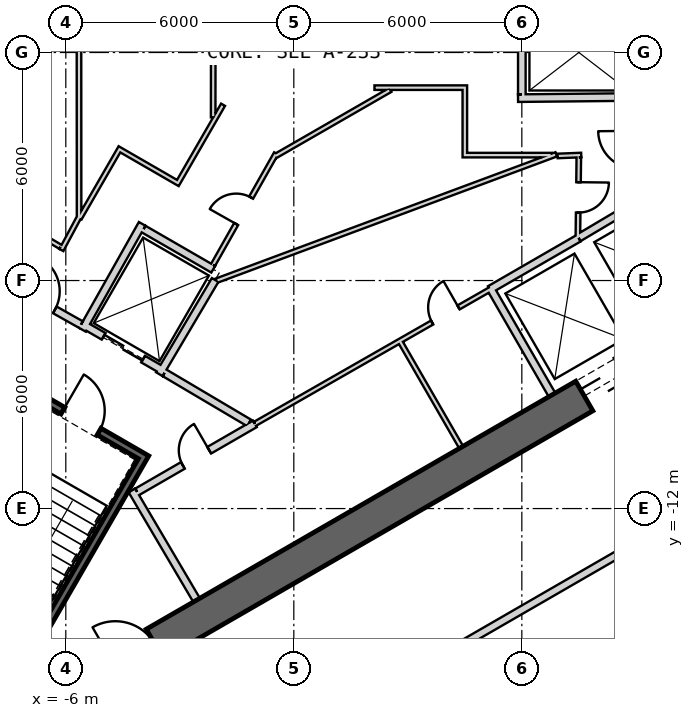
"""IFC4 building model, lengths in metres.
Left out: names, types, materials, properties, quantities, classifications, styles, units other than length and angle.
Written with IfcOpenShell. Run it as: python <this file> out.ifc"""

import sys

from ifc_helpers import new_model, si_unit, direction, frame, frame_2d, origin, place, context, subcontext, project, spatial, rectangle, extrude, element, fill, save


model = new_model("IFC4")
c1 = context("Model", 3, precision=1e-05, world=origin(), true_north=direction((0.0, 1.0)))
c2 = subcontext(c1, "Body", "Model", "MODEL_VIEW")
j1 = project(units=[si_unit("LENGTHUNIT", "METRE"), si_unit("PLANEANGLEUNIT", "RADIAN")], contexts=[c1])
p1 = place(None, origin())
s1 = spatial("IfcSite", under=j1, at=p1, CompositionType="ELEMENT")
p2 = place(p1, origin())
s2 = spatial("IfcBuilding", under=s1, at=p2, CompositionType="ELEMENT")
p3 = place(p2, frame((0.0, 0.0, 298.7)))
s3 = spatial("IfcBuildingStorey", under=s2, at=p3, CompositionType="ELEMENT", Elevation=298.7)
p4 = place(p3, frame((-7.825, -17.97, 0.0), z_axis=(0.0, 0.0, 1.0), x_axis=(0.866028369851, 0.499994862586, 0.0)))
e1 = element("IfcWall", 1, at=p4, inside=s3, PredefinedType="SHEAR", context=c2, shape_type="SweptSolid", body=[
    extrude(rectangle(XDim=31.523, YDim=0.9, at=frame_2d((15.762, 0.0))), origin(), (0.0, 0.0, 1.0), 3.9),
])
p5 = place(p4, frame((17.862, 0.0, 0.0)))
e2 = element("IfcOpeningElement", 2, at=p5, cuts=e1, PredefinedType="OPENING", context=c2, shape_type="SweptSolid", body=[
    extrude(rectangle(XDim=1.2, YDim=2.4, at=frame_2d((0.6, 1.2))), frame((0.0, 0.46, 0.0), z_axis=(0.0, -1.0, 0.0), x_axis=(1.0, 0.0, 0.0)), (0.0, 0.0, 1.0), 0.92),
])
p6 = place(p4, frame((20.562, 0.0, 0.0)))
e3 = element("IfcOpeningElement", 3, at=p6, cuts=e1, PredefinedType="OPENING", context=c2, shape_type="SweptSolid", body=[
    extrude(rectangle(XDim=1.2, YDim=2.4, at=frame_2d((0.6, 1.2))), frame((0.0, 0.46, 0.0), z_axis=(0.0, -1.0, 0.0), x_axis=(1.0, 0.0, 0.0)), (0.0, 0.0, 1.0), 0.92),
])
p7 = place(p4, frame((26.712, 0.0, 0.0)))
e4 = element("IfcOpeningElement", 4, at=p7, cuts=e1, PredefinedType="OPENING", context=c2, shape_type="SweptSolid", body=[
    extrude(rectangle(XDim=1.2, YDim=2.4, at=frame_2d((0.6, 1.2))), frame((0.0, 0.46, 0.0), z_axis=(0.0, -1.0, 0.0), x_axis=(1.0, 0.0, 0.0)), (0.0, 0.0, 1.0), 0.92),
])
p8 = place(p4, frame((3.612, 0.0, 0.0)))
e5 = element("IfcOpeningElement", 5, at=p8, cuts=e1, PredefinedType="OPENING", context=c2, shape_type="SweptSolid", body=[
    extrude(rectangle(XDim=1.2, YDim=2.4, at=frame_2d((0.6, 1.2))), frame((0.0, 0.46, 0.0), z_axis=(0.0, -1.0, 0.0), x_axis=(1.0, 0.0, 0.0)), (0.0, 0.0, 1.0), 0.92),
])
p9 = place(p3, frame((6.795, -9.01, 0.0), z_axis=(0.0, 0.0, 1.0), x_axis=(-0.499984717929, 0.866034226713, 0.0)))
e6 = element("IfcWall", 6, at=p9, inside=s3, PredefinedType="PLUMBINGWALL", context=c2, shape_type="SweptSolid", body=[
    extrude(rectangle(XDim=3.25, YDim=0.2, at=frame_2d((1.625, 0.0))), origin(), (0.0, 0.0, 1.0), 3.6),
])
p10 = place(p3, frame((5.159, -6.236, 0.0), z_axis=(0.0, 0.0, 1.0), x_axis=(0.866036505625, 0.499980770555, 0.0)))
e7 = element("IfcWall", 7, at=p10, inside=s3, PredefinedType="PLUMBINGWALL", context=c2, shape_type="SweptSolid", body=[
    extrude(rectangle(XDim=2.7, YDim=0.2, at=frame_2d((1.35, 0.0))), origin(), (0.0, 0.0, 1.0), 3.6),
])
p11 = place(p3, frame((7.493, -4.878, 0.0), z_axis=(0.0, 0.0, 1.0), x_axis=(0.859981807212, 0.510324691999, 0.0)))
e8 = element("IfcWall", 8, at=p11, inside=s3, PredefinedType="PLUMBINGWALL", context=c2, shape_type="SweptSolid", body=[
    extrude(rectangle(XDim=1.845, YDim=0.2, at=frame_2d((0.922, 0.0))), origin(), (0.0, 0.0, 1.0), 3.6),
])
p12 = place(p3, frame((5.9, -1.201, 0.0), z_axis=(0.0, 0.0, 1.0), x_axis=(0.999950064753, 0.009993397809, 0.0)))
e9 = element("IfcWall", 9, at=p12, inside=s3, PredefinedType="PLUMBINGWALL", context=c2, shape_type="SweptSolid", body=[
    extrude(rectangle(XDim=3.2, YDim=0.2, at=frame_2d((1.6, 0.0))), origin(), (0.0, 0.0, 1.0), 3.6),
])
p13 = place(p3, frame((6.0, -1.1, 0.0), z_axis=(0.0, 0.0, 1.0), x_axis=(0.0, 1.0, 0.0)))
e10 = element("IfcWall", 10, at=p13, inside=s3, PredefinedType="PLUMBINGWALL", context=c2, shape_type="SweptSolid", body=[
    extrude(rectangle(XDim=2.13, YDim=0.2, at=frame_2d((1.065, 0.0))), origin(), (0.0, 0.0, 1.0), 3.6),
])
p14 = place(p3, frame((-3.905, -10.563, -0.3), z_axis=(0.0, 0.0, 1.0), x_axis=(-0.500012932018, -0.866017937352, 0.0)))
e11 = element("IfcWall", 11, at=p14, inside=s3, PredefinedType="SHEAR", context=c2, shape_type="SweptSolid", body=[
    extrude(rectangle(XDim=8.1, YDim=0.2, at=frame_2d((4.05, 0.0))), origin(), (0.0, 0.0, 1.0), 3.9),
])
p15 = place(p3, frame((-4.041, -10.599, -0.3), z_axis=(0.0, 0.0, 1.0), x_axis=(-0.866047807691, 0.499961193289, 0.0)))
e12 = element("IfcWall", 12, at=p15, inside=s3, PredefinedType="SHEAR", context=c2, shape_type="SweptSolid", body=[
    extrude(rectangle(XDim=3.6, YDim=0.2, at=frame_2d((1.8, 0.0))), origin(), (0.0, 0.0, 1.0), 3.9),
])
p16 = place(p15, frame((1.25, 0.0, 0.3)))
e13 = element("IfcOpeningElement", 13, at=p16, cuts=e12, PredefinedType="OPENING", context=c2, shape_type="SweptSolid", body=[
    extrude(rectangle(XDim=1.1, YDim=2.1, at=frame_2d((0.55, 1.05))), frame((0.0, 0.11, 0.0), z_axis=(0.0, -1.0, 0.0), x_axis=(1.0, 0.0, 0.0)), (0.0, 0.0, 1.0), 0.22),
])
p17 = place(p3, frame((-3.446, -8.368, 0.0), z_axis=(0.0, 0.0, 1.0), x_axis=(-0.866024647952, 0.500001309137, 0.0)))
e14 = element("IfcWall", 14, at=p17, inside=s3, PredefinedType="PLUMBINGWALL", context=c2, shape_type="SweptSolid", body=[
    extrude(rectangle(XDim=2.4, YDim=0.2, at=frame_2d((1.2, 0.0))), origin(), (0.0, 0.0, 1.0), 3.6),
])
p18 = place(p17, frame((0.6, 0.0, 0.0)))
e15 = element("IfcOpeningElement", 15, at=p18, cuts=e14, PredefinedType="OPENING", context=c2, shape_type="SweptSolid", body=[
    extrude(rectangle(XDim=1.2, YDim=2.4, at=frame_2d((0.6, 1.2))), frame((0.0, 0.11, 0.0), z_axis=(0.0, -1.0, 0.0), x_axis=(1.0, 0.0, 0.0)), (0.0, 0.0, 1.0), 0.22),
])
p19 = place(p3, frame((-2.07, -5.986, 0.0), z_axis=(0.0, 0.0, 1.0), x_axis=(-0.509302965445, -0.8605872933, 0.0)))
e16 = element("IfcWall", 16, at=p19, inside=s3, PredefinedType="PLUMBINGWALL", context=c2, shape_type="SweptSolid", body=[
    extrude(rectangle(XDim=2.881, YDim=0.2, at=frame_2d((1.441, 0.0))), origin(), (0.0, 0.0, 1.0), 3.6),
])
p20 = place(p3, frame((-3.99, -4.509, 0.0), z_axis=(0.0, 0.0, 1.0), x_axis=(-0.491358283181, -0.870957540612, 0.0)))
e17 = element("IfcWall", 17, at=p20, inside=s3, PredefinedType="PLUMBINGWALL", context=c2, shape_type="SweptSolid", body=[
    extrude(rectangle(XDim=3.2, YDim=0.2, at=frame_2d((1.6, 0.0))), origin(), (0.0, 0.0, 1.0), 3.6),
])
p21 = place(p3, frame((-3.953, -4.646, 0.0), z_axis=(0.0, 0.0, 1.0), x_axis=(0.866060616833, -0.499939004251, 0.0)))
e18 = element("IfcWall", 18, at=p21, inside=s3, PredefinedType="PLUMBINGWALL", context=c2, shape_type="SweptSolid", body=[
    extrude(rectangle(XDim=2.115, YDim=0.2, at=frame_2d((1.057, 0.0))), origin(), (0.0, 0.0, 1.0), 3.6),
])
p22 = place(p3, frame((4.405, -10.389, 0.0), z_axis=(0.0, 0.0, 1.0), x_axis=(-0.500017246033, 0.866015446554, 0.0)))
e19 = element("IfcWall", 19, at=p22, inside=s3, PredefinedType="PARTITIONING", context=c2, shape_type="SweptSolid", body=[
    extrude(rectangle(XDim=3.25, YDim=0.12, at=frame_2d((1.625, 0.0))), origin(), (0.0, 0.0, 1.0), 3.6),
])
p23 = place(p3, frame((-4.26, -11.524, 0.0), z_axis=(0.0, 0.0, 1.0), x_axis=(0.507997497166, -0.861358544901, 0.0)))
e20 = element("IfcWall", 20, at=p23, inside=s3, PredefinedType="PARTITIONING", context=c2, shape_type="SweptSolid", body=[
    extrude(rectangle(XDim=3.35, YDim=0.2, at=frame_2d((1.675, 0.0))), origin(), (0.0, 0.0, 1.0), 3.6),
])
p24 = place(p3, frame((-1.024, -9.771, 0.0), z_axis=(0.0, 0.0, 1.0), x_axis=(-0.866029903013, -0.499992207027, 0.0)))
e21 = element("IfcWall", 21, at=p24, inside=s3, PredefinedType="PARTITIONING", context=c2, shape_type="SweptSolid", body=[
    extrude(rectangle(XDim=3.578, YDim=0.2, at=frame_2d((1.789, 0.0))), origin(), (0.0, 0.0, 1.0), 3.6),
])
p25 = place(p24, frame((1.389, 0.0, 0.0)))
e22 = element("IfcOpeningElement", 22, at=p25, cuts=e21, PredefinedType="OPENING", context=c2, shape_type="SweptSolid", body=[
    extrude(rectangle(XDim=0.8, YDim=2.1, at=frame_2d((0.4, 1.05))), frame((0.0, 0.11, 0.0), z_axis=(0.0, -1.0, 0.0), x_axis=(1.0, 0.0, 0.0)), (0.0, 0.0, 1.0), 0.22),
])
p26 = place(p3, frame((-1.024, -9.771, 0.0), z_axis=(0.0, 0.0, 1.0), x_axis=(0.868110220015, 0.496371479746, 0.0)))
e23 = element("IfcWall", 23, at=p26, inside=s3, PredefinedType="PARTITIONING", context=c2, shape_type="SweptSolid", body=[
    extrude(rectangle(XDim=7.123, YDim=0.12, at=frame_2d((3.561, 0.0))), origin(), (0.0, 0.0, 1.0), 3.6),
])
p27 = place(p26, frame((5.373, 0.0, 0.0)))
e24 = element("IfcOpeningElement", 24, at=p27, cuts=e23, PredefinedType="OPENING", context=c2, shape_type="SweptSolid", body=[
    extrude(rectangle(XDim=0.8, YDim=2.1, at=frame_2d((0.4, 1.05))), frame((0.0, 0.07, 0.0), z_axis=(0.0, -1.0, 0.0), x_axis=(1.0, 0.0, 0.0)), (0.0, 0.0, 1.0), 0.14),
])
p28 = place(p3, frame((-3.401, -8.43, 0.0), z_axis=(0.0, 0.0, 1.0), x_axis=(0.860630814782, -0.509229418482, 0.0)))
e25 = element("IfcWall", 25, at=p28, inside=s3, PredefinedType="PARTITIONING", context=c2, shape_type="SweptSolid", body=[
    extrude(rectangle(XDim=2.582, YDim=0.2, at=frame_2d((1.291, 0.0))), origin(), (0.0, 0.0, 1.0), 3.6),
])
p29 = place(p3, frame((-7.849, -5.894, 0.0), z_axis=(0.0, 0.0, 1.0), x_axis=(0.871363259478, -0.490638431059, 0.0)))
e26 = element("IfcWall", 26, at=p29, inside=s3, PredefinedType="PARTITIONING", context=c2, shape_type="SweptSolid", body=[
    extrude(rectangle(XDim=2.581, YDim=0.2, at=frame_2d((1.291, 0.0))), origin(), (0.0, 0.0, 1.0), 3.6),
])
p30 = place(p29, frame((0.791, 0.0, 0.0)))
e27 = element("IfcOpeningElement", 27, at=p30, cuts=e26, PredefinedType="OPENING", context=c2, shape_type="SweptSolid", body=[
    extrude(rectangle(XDim=1.0, YDim=2.1, at=frame_2d((0.5, 1.05))), frame((0.0, 0.11, 0.0), z_axis=(0.0, -1.0, 0.0), x_axis=(1.0, 0.0, 0.0)), (0.0, 0.0, 1.0), 0.22),
])
p31 = place(p3, frame((6.905, -2.679, 0.0), z_axis=(0.0, 0.0, 1.0), x_axis=(-0.937260745886, -0.348629164331, 0.0)))
e28 = element("IfcWall", 28, at=p31, inside=s3, PredefinedType="PARTITIONING", context=c2, shape_type="SweptSolid", body=[
    extrude(rectangle(XDim=9.541, YDim=0.12, at=frame_2d((4.771, 0.0))), origin(), (0.0, 0.0, 1.0), 3.6),
])
p32 = place(p3, frame((-0.466, -2.655, 0.0), z_axis=(0.0, 0.0, 1.0), x_axis=(-0.49235580986, -0.870394023703, 0.0)))
e29 = element("IfcWall", 29, at=p32, inside=s3, PredefinedType="PARTITIONING", context=c2, shape_type="SweptSolid", body=[
    extrude(rectangle(XDim=3.368, YDim=0.12, at=frame_2d((1.684, 0.0))), origin(), (0.0, 0.0, 1.0), 3.6),
])
p33 = place(p32, frame((1.335, 0.0, 0.0)))
e30 = element("IfcOpeningElement", 30, at=p33, cuts=e29, PredefinedType="OPENING", context=c2, shape_type="SweptSolid", body=[
    extrude(rectangle(XDim=0.8, YDim=2.1, at=frame_2d((0.4, 1.05))), frame((0.0, 0.07, 0.0), z_axis=(0.0, -1.0, 0.0), x_axis=(1.0, 0.0, 0.0)), (0.0, 0.0, 1.0), 0.14),
])
p34 = place(p3, frame((2.539, -0.985, 0.0), z_axis=(0.0, 0.0, 1.0), x_axis=(-0.866657135765, -0.498904208268, 0.0)))
e31 = element("IfcWall", 31, at=p34, inside=s3, PredefinedType="PARTITIONING", context=c2, shape_type="SweptSolid", body=[
    extrude(rectangle(XDim=3.505, YDim=0.12, at=frame_2d((1.752, 0.0))), origin(), (0.0, 0.0, 1.0), 3.6),
])
p35 = place(p3, frame((4.56, -0.925, 0.0), z_axis=(0.0, 0.0, 1.0), x_axis=(-1.0, 0.0, 0.0)))
e32 = element("IfcWall", 32, at=p35, inside=s3, PredefinedType="PARTITIONING", context=c2, shape_type="SweptSolid", body=[
    extrude(rectangle(XDim=2.438, YDim=0.12, at=frame_2d((1.219, 0.0))), origin(), (0.0, 0.0, 1.0), 3.6),
])
p36 = place(p3, frame((4.5, -2.76, 0.0), z_axis=(0.0, 0.0, 1.0), x_axis=(0.0, 1.0, 0.0)))
e33 = element("IfcWall", 33, at=p36, inside=s3, PredefinedType="PARTITIONING", context=c2, shape_type="SweptSolid", body=[
    extrude(rectangle(XDim=1.775, YDim=0.12, at=frame_2d((0.887, 0.0))), origin(), (0.0, 0.0, 1.0), 3.6),
])
p37 = place(p3, frame((6.789, -2.7, 0.0), z_axis=(0.0, 0.0, 1.0), x_axis=(-1.0, 0.0, 0.0)))
e34 = element("IfcWall", 34, at=p37, inside=s3, PredefinedType="PARTITIONING", context=c2, shape_type="SweptSolid", body=[
    extrude(rectangle(XDim=2.229, YDim=0.12, at=frame_2d((1.115, 0.0))), origin(), (0.0, 0.0, 1.0), 3.6),
])
p38 = place(p3, frame((7.563, -2.698, 0.0), z_axis=(0.0, 0.0, 1.0), x_axis=(-0.999184595054, -0.040375054253, 0.0)))
e35 = element("IfcWall", 35, at=p38, inside=s3, PredefinedType="PARTITIONING", context=c2, shape_type="SweptSolid", body=[
    extrude(rectangle(XDim=0.623, YDim=0.12, at=frame_2d((0.312, 0.0))), origin(), (0.0, 0.0, 1.0), 3.6),
])
p39 = place(p3, frame((7.475, -4.865, 0.0), z_axis=(0.0, 0.0, 1.0), x_axis=(0.011716133148, 0.999931363757, 0.0)))
e36 = element("IfcWall", 36, at=p39, inside=s3, PredefinedType="PARTITIONING", context=c2, shape_type="SweptSolid", body=[
    extrude(rectangle(XDim=2.105, YDim=0.12, at=frame_2d((1.052, 0.0))), origin(), (0.0, 0.0, 1.0), 3.6),
])
p40 = place(p39, frame((0.652, 0.0, 0.0)))
e37 = element("IfcOpeningElement", 37, at=p40, cuts=e36, PredefinedType="OPENING", context=c2, shape_type="SweptSolid", body=[
    extrude(rectangle(XDim=0.8, YDim=2.1, at=frame_2d((0.4, 1.05))), frame((0.0, 0.07, 0.0), z_axis=(0.0, -1.0, 0.0), x_axis=(1.0, 0.0, 0.0)), (0.0, 0.0, 1.0), 0.14),
])
p41 = place(p3, frame((-5.651, -4.388, 0.0), z_axis=(0.0, 0.0, 1.0), x_axis=(-0.000472563465, 0.999999888342, 0.0)))
e38 = element("IfcWall", 38, at=p41, inside=s3, PredefinedType="PARTITIONING", context=c2, shape_type="SweptSolid", body=[
    extrude(rectangle(XDim=8.783, YDim=0.12, at=frame_2d((4.391, 0.0))), origin(), (0.0, 0.0, 1.0), 3.6),
])
p42 = place(p3, frame((-6.117, -5.198, 0.0), z_axis=(0.0, 0.0, 1.0), x_axis=(0.473067931341, 0.881025954406, 0.0)))
e39 = element("IfcWall", 39, at=p42, inside=s3, PredefinedType="PARTITIONING", context=c2, shape_type="SweptSolid", body=[
    extrude(rectangle(XDim=1.016, YDim=0.12, at=frame_2d((0.508, 0.0))), origin(), (0.0, 0.0, 1.0), 3.6),
])
p43 = place(p3, frame((-7.95, -4.041, 0.0), z_axis=(0.0, 0.0, 1.0), x_axis=(0.860112457103, -0.510104461004, 0.0)))
e40 = element("IfcWall", 40, at=p43, inside=s3, PredefinedType="PARTITIONING", context=c2, shape_type="SweptSolid", body=[
    extrude(rectangle(XDim=2.104, YDim=0.12, at=frame_2d((1.052, 0.0))), origin(), (0.0, 0.0, 1.0), 3.6),
])
p44 = place(p3, frame((-2.122, -1.706, 0.0), z_axis=(0.0, 0.0, 1.0), x_axis=(0.001253480909, 0.999999214392, 0.0)))
e41 = element("IfcWall", 41, at=p44, inside=s3, PredefinedType="PARTITIONING", context=c2, shape_type="SweptSolid", body=[
    extrude(rectangle(XDim=3.506, YDim=0.12, at=frame_2d((1.753, 0.0))), origin(), (0.0, 0.0, 1.0), 3.6),
])
p45 = place(p44, frame((1.594, 0.0, 0.0)))
e42 = element("IfcOpeningElement", 42, at=p45, cuts=e41, PredefinedType="OPENING", context=c2, shape_type="SweptSolid", body=[
    extrude(rectangle(XDim=0.8, YDim=2.1, at=frame_2d((0.4, 1.05))), frame((0.0, 0.07, 0.0), z_axis=(0.0, -1.0, 0.0), x_axis=(1.0, 0.0, 0.0)), (0.0, 0.0, 1.0), 0.14),
])
p46 = place(p3, frame((-3.081, -3.487, 0.0), z_axis=(0.0, 0.0, 1.0), x_axis=(0.499962263673, 0.866047189767, 0.0)))
e43 = element("IfcWall", 43, at=p46, inside=s3, PredefinedType="PARTITIONING", context=c2, shape_type="SweptSolid", body=[
    extrude(rectangle(XDim=2.438, YDim=0.12, at=frame_2d((1.219, 0.0))), origin(), (0.0, 0.0, 1.0), 3.6),
])
p47 = place(p3, frame((-4.64, -2.517, 0.0), z_axis=(0.0, 0.0, 1.0), x_axis=(0.866025242659, -0.500000279077, 0.0)))
e44 = element("IfcWall", 44, at=p47, inside=s3, PredefinedType="PARTITIONING", context=c2, shape_type="SweptSolid", body=[
    extrude(rectangle(XDim=1.775, YDim=0.12, at=frame_2d((0.887, 0.0))), origin(), (0.0, 0.0, 1.0), 3.6),
])
p48 = place(p3, frame((-5.636, -4.362, 0.0), z_axis=(0.0, 0.0, 1.0), x_axis=(0.500099717341, 0.865967824295, 0.0)))
e45 = element("IfcWall", 45, at=p48, inside=s3, PredefinedType="PARTITIONING", context=c2, shape_type="SweptSolid", body=[
    extrude(rectangle(XDim=2.035, YDim=0.12, at=frame_2d((1.018, 0.0))), origin(), (0.0, 0.0, 1.0), 3.6),
])
p49 = place(p3, frame((1.415, -17.312, 0.0), z_axis=(0.0, 0.0, 1.0), x_axis=(0.866022488339, 0.500005049665, 0.0)))
e46 = element("IfcWall", 46, at=p49, inside=s3, PredefinedType="PARTITIONING", context=c2, shape_type="SweptSolid", body=[
    extrude(rectangle(XDim=23.806, YDim=0.2, at=frame_2d((11.903, 0.0))), origin(), (0.0, 0.0, 1.0), 2.88),
])
p50 = place(p49, frame((11.403, 0.0, 0.0)))
e47 = element("IfcOpeningElement", 47, at=p50, cuts=e46, PredefinedType="OPENING", context=c2, shape_type="SweptSolid", body=[
    extrude(rectangle(XDim=1.0, YDim=2.1, at=frame_2d((0.5, 1.05))), frame((0.0, 0.11, 0.0), z_axis=(0.0, -1.0, 0.0), x_axis=(1.0, 0.0, 0.0)), (0.0, 0.0, 1.0), 0.22),
])
p51 = place(p16, origin())
e48 = element("IfcDoor", 48, at=p51, inside=s3, OperationType="SINGLE_SWING_RIGHT", PredefinedType="USERDEFINED", context=c2, shape_type="SweptSolid", body=[
    extrude(rectangle(XDim=1.1, YDim=2.1, at=frame_2d((0.55, 1.05))), frame((0.0, 0.025, 0.0), z_axis=(0.0, -1.0, 0.0), x_axis=(1.0, 0.0, 0.0)), (0.0, 0.0, 1.0), 0.05),
])
fill(e13, e48)
p52 = place(p30, origin())
e49 = element("IfcDoor", 49, at=p52, inside=s3, OperationType="SINGLE_SWING_RIGHT", PredefinedType="USERDEFINED", context=c2, shape_type="SweptSolid", body=[
    extrude(rectangle(XDim=1.0, YDim=2.1, at=frame_2d((0.5, 1.05))), frame((0.0, 0.025, 0.0), z_axis=(0.0, -1.0, 0.0), x_axis=(1.0, 0.0, 0.0)), (0.0, 0.0, 1.0), 0.05),
])
fill(e27, e49)
p53 = place(p18, origin())
e50 = element("IfcDoor", 50, at=p53, inside=s3, OperationType="SLIDING_TO_LEFT", PredefinedType="USERDEFINED", context=c2, shape_type="SweptSolid", body=[
    extrude(rectangle(XDim=1.2, YDim=2.4, at=frame_2d((0.6, 1.2))), frame((0.0, 0.025, 0.0), z_axis=(0.0, -1.0, 0.0), x_axis=(1.0, 0.0, 0.0)), (0.0, 0.0, 1.0), 0.05),
])
fill(e15, e50)
p54 = place(p33, origin())
e51 = element("IfcDoor", 51, at=p54, inside=s3, OperationType="SINGLE_SWING_RIGHT", PredefinedType="USERDEFINED", context=c2, shape_type="SweptSolid", body=[
    extrude(rectangle(XDim=0.8, YDim=2.1, at=frame_2d((0.4, 1.05))), frame((0.0, 0.025, 0.0), z_axis=(0.0, -1.0, 0.0), x_axis=(1.0, 0.0, 0.0)), (0.0, 0.0, 1.0), 0.05),
])
fill(e30, e51)
p55 = place(p40, origin())
e52 = element("IfcDoor", 52, at=p55, inside=s3, OperationType="SINGLE_SWING_LEFT", PredefinedType="USERDEFINED", context=c2, shape_type="SweptSolid", body=[
    extrude(rectangle(XDim=0.8, YDim=2.1, at=frame_2d((0.4, 1.05))), frame((0.0, 0.025, 0.0), z_axis=(0.0, -1.0, 0.0), x_axis=(1.0, 0.0, 0.0)), (0.0, 0.0, 1.0), 0.05),
])
fill(e37, e52)
p56 = place(p45, origin())
e53 = element("IfcDoor", 53, at=p56, inside=s3, OperationType="SINGLE_SWING_LEFT", PredefinedType="USERDEFINED", context=c2, shape_type="SweptSolid", body=[
    extrude(rectangle(XDim=0.8, YDim=2.1, at=frame_2d((0.4, 1.05))), frame((0.0, 0.025, 0.0), z_axis=(0.0, -1.0, 0.0), x_axis=(1.0, 0.0, 0.0)), (0.0, 0.0, 1.0), 0.05),
])
fill(e42, e53)
p57 = place(p25, origin())
e54 = element("IfcDoor", 54, at=p57, inside=s3, OperationType="SINGLE_SWING_LEFT", PredefinedType="USERDEFINED", context=c2, shape_type="SweptSolid", body=[
    extrude(rectangle(XDim=0.8, YDim=2.1, at=frame_2d((0.4, 1.05))), frame((0.0, 0.025, 0.0), z_axis=(0.0, -1.0, 0.0), x_axis=(1.0, 0.0, 0.0)), (0.0, 0.0, 1.0), 0.05),
])
fill(e22, e54)
p58 = place(p27, origin())
e55 = element("IfcDoor", 55, at=p58, inside=s3, OperationType="SINGLE_SWING_RIGHT", PredefinedType="USERDEFINED", context=c2, shape_type="SweptSolid", body=[
    extrude(rectangle(XDim=0.8, YDim=2.1, at=frame_2d((0.4, 1.05))), frame((0.0, 0.025, 0.0), z_axis=(0.0, -1.0, 0.0), x_axis=(1.0, 0.0, 0.0)), (0.0, 0.0, 1.0), 0.05),
])
fill(e24, e55)
p59 = place(p5, origin())
e56 = element("IfcDoor", 56, at=p59, inside=s3, OperationType="SLIDING_TO_LEFT", PredefinedType="USERDEFINED", context=c2, shape_type="SweptSolid", body=[
    extrude(rectangle(XDim=1.2, YDim=2.4, at=frame_2d((0.6, 1.2))), frame((0.0, 0.025, 0.0), z_axis=(0.0, -1.0, 0.0), x_axis=(1.0, 0.0, 0.0)), (0.0, 0.0, 1.0), 0.05),
])
fill(e2, e56)
save(model, sys.argv[1])
